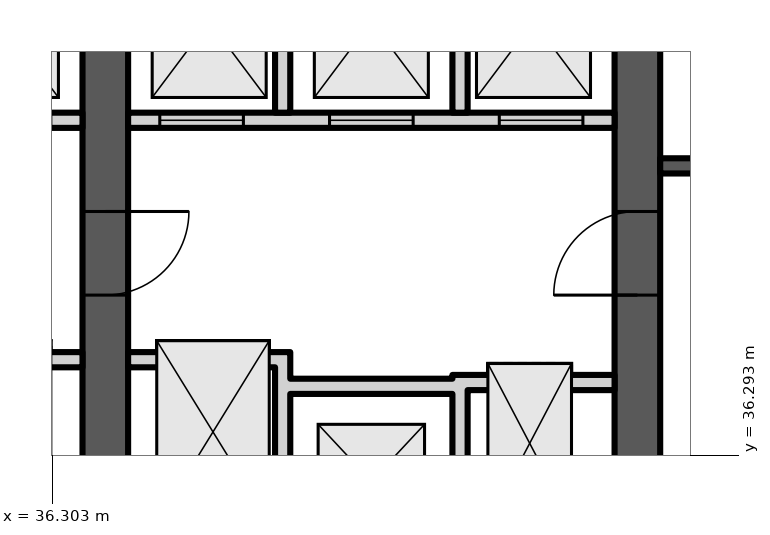
"""IFC4 building model, lengths in metres.
Left out: names, types, materials, properties, quantities, classifications, styles, units other than length and angle.
Written with IfcOpenShell. Run it as: python <this file> out.ifc"""

import sys

from ifc_helpers import new_model, si_unit, direction, frame, frame_2d, origin, place, context, subcontext, project, spatial, polyline, rectangle, outline, extrude, element, fill, save


model = new_model("IFC4")
c1 = context("Model", 3, precision=1e-05, world=origin(), true_north=direction((0.0, 1.0)))
c2 = subcontext(c1, "Body", "Model", "MODEL_VIEW")
j1 = project(units=[si_unit("LENGTHUNIT", "METRE"), si_unit("PLANEANGLEUNIT", "RADIAN")], contexts=[c1])
p1 = place(None, origin())
s1 = spatial("IfcSite", under=j1, at=p1, CompositionType="ELEMENT")
p2 = place(p1, origin())
s2 = spatial("IfcBuilding", under=s1, at=p2, CompositionType="ELEMENT")
p3 = place(p2, frame((0.0, 0.0, 257.5)))
s3 = spatial("IfcBuildingStorey", under=s2, at=p3, CompositionType="ELEMENT", Elevation=257.5)
p4 = place(p3, frame((37.0, 34.6, 0.0), z_axis=(0.0, 0.0, 1.0), x_axis=(0.0, 1.0, 0.0)))
e1 = element("IfcWall", 1, at=p4, inside=s3, PredefinedType="SHEAR", context=c2, shape_type="SweptSolid", body=[
    extrude(rectangle(XDim=14.784, YDim=0.6, at=frame_2d((7.392, 0.0))), origin(), (0.0, 0.0, 1.0), 3.6),
])
p5 = place(p4, frame((11.302, 0.0, 0.0)))
e2 = element("IfcOpeningElement", 2, at=p5, cuts=e1, PredefinedType="OPENING", context=c2, shape_type="SweptSolid", body=[
    extrude(rectangle(XDim=1.0, YDim=2.1, at=frame_2d((0.5, 1.05))), frame((0.0, 0.31, 0.0), z_axis=(0.0, -1.0, 0.0), x_axis=(1.0, 0.0, 0.0)), (0.0, 0.0, 1.0), 0.62),
])
p6 = place(p4, frame((3.8, 0.0, 0.0)))
e3 = element("IfcOpeningElement", 3, at=p6, cuts=e1, PredefinedType="OPENING", context=c2, shape_type="SweptSolid", body=[
    extrude(rectangle(XDim=1.1, YDim=2.1, at=frame_2d((0.55, 1.05))), frame((0.0, 0.31, 0.0), z_axis=(0.0, -1.0, 0.0), x_axis=(1.0, 0.0, 0.0)), (0.0, 0.0, 1.0), 0.62),
])
p7 = place(p3, frame((44.0, 34.6, 0.0), z_axis=(0.0, 0.0, 1.0), x_axis=(0.0, 1.0, 0.0)))
e4 = element("IfcWall", 4, at=p7, inside=s3, PredefinedType="SHEAR", context=c2, shape_type="SweptSolid", body=[
    extrude(rectangle(XDim=14.784, YDim=0.6, at=frame_2d((7.392, 0.0))), origin(), (0.0, 0.0, 1.0), 3.6),
])
p8 = place(p7, frame((11.608, 0.0, 0.0)))
e5 = element("IfcOpeningElement", 5, at=p8, cuts=e4, PredefinedType="OPENING", context=c2, shape_type="SweptSolid", body=[
    extrude(rectangle(XDim=1.0, YDim=2.1, at=frame_2d((0.5, 1.05))), frame((0.0, 0.31, 0.0), z_axis=(0.0, -1.0, 0.0), x_axis=(1.0, 0.0, 0.0)), (0.0, 0.0, 1.0), 0.62),
])
p9 = place(p7, frame((3.8, 0.0, 0.0)))
e6 = element("IfcOpeningElement", 6, at=p9, cuts=e4, PredefinedType="OPENING", context=c2, shape_type="SweptSolid", body=[
    extrude(rectangle(XDim=1.1, YDim=2.1, at=frame_2d((0.55, 1.05))), frame((0.0, 0.31, 0.0), z_axis=(0.0, -1.0, 0.0), x_axis=(1.0, 0.0, 0.0)), (0.0, 0.0, 1.0), 0.62),
])
p10 = place(p3, frame((30.3, 40.7, 0.0), z_axis=(0.0, 0.0, 1.0), x_axis=(1.0, 0.0, 0.0)))
e7 = element("IfcWall", 7, at=p10, inside=s3, PredefinedType="PARTITIONING", context=c2, shape_type="SweptSolid", body=[
    extrude(rectangle(XDim=6.4, YDim=0.2, at=frame_2d((3.2, 0.0))), origin(), (0.0, 0.0, 1.0), 3.2),
])
p11 = place(p10, frame((0.417, 0.0, 0.0)))
e8 = element("IfcOpeningElement", 8, at=p11, cuts=e7, PredefinedType="OPENING", context=c2, shape_type="SweptSolid", body=[
    extrude(rectangle(XDim=1.1, YDim=2.1, at=frame_2d((0.55, 1.05))), frame((0.0, 0.11, 0.0), z_axis=(0.0, -1.0, 0.0), x_axis=(1.0, 0.0, 0.0)), (0.0, 0.0, 1.0), 0.22),
])
p12 = place(p10, frame((2.65, 0.0, 0.0)))
e9 = element("IfcOpeningElement", 9, at=p12, cuts=e7, PredefinedType="OPENING", context=c2, shape_type="SweptSolid", body=[
    extrude(rectangle(XDim=1.1, YDim=2.1, at=frame_2d((0.55, 1.05))), frame((0.0, 0.11, 0.0), z_axis=(0.0, -1.0, 0.0), x_axis=(1.0, 0.0, 0.0)), (0.0, 0.0, 1.0), 0.22),
])
p13 = place(p10, frame((4.883, 0.0, 0.0)))
e10 = element("IfcOpeningElement", 10, at=p13, cuts=e7, PredefinedType="OPENING", context=c2, shape_type="SweptSolid", body=[
    extrude(rectangle(XDim=1.1, YDim=2.1, at=frame_2d((0.55, 1.05))), frame((0.0, 0.11, 0.0), z_axis=(0.0, -1.0, 0.0), x_axis=(1.0, 0.0, 0.0)), (0.0, 0.0, 1.0), 0.22),
])
p14 = place(p3, frame((0.0, 0.0, -0.0)))
e11 = element("IfcWall", 11, at=p14, inside=s3, PredefinedType="PARTITIONING", context=c2, shape_type="SweptSolid", body=[
    extrude(outline(polyline([(34.567, 37.65), (34.767, 37.65), (36.7, 37.65), (36.7, 37.45), (34.767, 37.45), (34.767, 34.6), (34.567, 34.6), (34.567, 37.65)])), origin(), (0.0, 0.0, 1.0), 3.2),
])
p15 = place(p3, frame((0.0, 0.0, -0.0)))
e12 = element("IfcWall", 12, at=p15, inside=s3, PredefinedType="PARTITIONING", context=c2, shape_type="SweptSolid", body=[
    extrude(outline(polyline([(32.433, 40.8), (32.233, 40.8), (32.233, 43.8), (30.3, 43.8), (30.3, 44.0), (36.7, 44.0), (36.7, 43.8), (34.767, 43.8), (34.767, 40.8), (34.567, 40.8), (34.567, 43.8), (32.433, 43.8), (32.433, 40.8)])), origin(), (0.0, 0.0, 1.0), 3.2),
])
p16 = place(p3, frame((37.3, 40.7, 0.0), z_axis=(0.0, 0.0, 1.0), x_axis=(1.0, 0.0, 0.0)))
e13 = element("IfcWall", 13, at=p16, inside=s3, PredefinedType="PARTITIONING", context=c2, shape_type="SweptSolid", body=[
    extrude(rectangle(XDim=6.4, YDim=0.2, at=frame_2d((3.2, 0.0))), origin(), (0.0, 0.0, 1.0), 3.2),
])
p17 = place(p16, frame((0.417, 0.0, 0.0)))
e14 = element("IfcOpeningElement", 14, at=p17, cuts=e13, PredefinedType="OPENING", context=c2, shape_type="SweptSolid", body=[
    extrude(rectangle(XDim=1.1, YDim=2.1, at=frame_2d((0.55, 1.05))), frame((0.0, 0.11, 0.0), z_axis=(0.0, -1.0, 0.0), x_axis=(1.0, 0.0, 0.0)), (0.0, 0.0, 1.0), 0.22),
])
p18 = place(p16, frame((2.65, 0.0, 0.0)))
e15 = element("IfcOpeningElement", 15, at=p18, cuts=e13, PredefinedType="OPENING", context=c2, shape_type="SweptSolid", body=[
    extrude(rectangle(XDim=1.1, YDim=2.1, at=frame_2d((0.55, 1.05))), frame((0.0, 0.11, 0.0), z_axis=(0.0, -1.0, 0.0), x_axis=(1.0, 0.0, 0.0)), (0.0, 0.0, 1.0), 0.22),
])
p19 = place(p16, frame((4.883, 0.0, 0.0)))
e16 = element("IfcOpeningElement", 16, at=p19, cuts=e13, PredefinedType="OPENING", context=c2, shape_type="SweptSolid", body=[
    extrude(rectangle(XDim=1.1, YDim=2.1, at=frame_2d((0.55, 1.05))), frame((0.0, 0.11, 0.0), z_axis=(0.0, -1.0, 0.0), x_axis=(1.0, 0.0, 0.0)), (0.0, 0.0, 1.0), 0.22),
])
p20 = place(p3, frame((0.0, 0.0, -0.0)))
e17 = element("IfcWall", 17, at=p20, inside=s3, PredefinedType="PARTITIONING", context=c2, shape_type="SweptSolid", body=[
    extrude(outline(polyline([(41.567, 37.1), (39.433, 37.1), (39.433, 34.6), (39.233, 34.6), (39.233, 37.45), (37.3, 37.45), (37.3, 37.65), (39.233, 37.65), (39.433, 37.65), (39.433, 37.3), (41.567, 37.3), (41.567, 37.35), (41.767, 37.35), (43.7, 37.35), (43.7, 37.15), (41.767, 37.15), (41.767, 34.6), (41.567, 34.6), (41.567, 37.1)])), origin(), (0.0, 0.0, 1.0), 3.2),
])
p21 = place(p3, frame((0.0, 0.0, -0.0)))
e18 = element("IfcWall", 18, at=p21, inside=s3, PredefinedType="PARTITIONING", context=c2, shape_type="SweptSolid", body=[
    extrude(outline(polyline([(39.433, 40.8), (39.233, 40.8), (39.233, 43.8), (37.3, 43.8), (37.3, 44.0), (43.7, 44.0), (43.7, 43.8), (41.767, 43.8), (41.767, 40.8), (41.567, 40.8), (41.567, 43.8), (39.433, 43.8), (39.433, 40.8)])), origin(), (0.0, 0.0, 1.0), 3.2),
])
p22 = place(p3, frame((44.3, 40.1, 0.0), z_axis=(0.0, 0.0, 1.0), x_axis=(1.0, 0.0, 0.0)))
e19 = element("IfcWall", 19, at=p22, inside=s3, PredefinedType="SHEAR", context=c2, shape_type="SweptSolid", body=[
    extrude(rectangle(XDim=6.4, YDim=0.2, at=frame_2d((3.2, 0.0))), origin(), (0.0, 0.0, 1.0), 3.2),
])
p23 = place(p22, frame((3.625, 0.0, 0.0)))
e20 = element("IfcOpeningElement", 20, at=p23, cuts=e19, PredefinedType="OPENING", context=c2, shape_type="SweptSolid", body=[
    extrude(rectangle(XDim=1.2, YDim=2.1, at=frame_2d((0.6, 1.05))), frame((0.0, 0.11, 0.0), z_axis=(0.0, -1.0, 0.0), x_axis=(1.0, 0.0, 0.0)), (0.0, 0.0, 1.0), 0.22),
])
p24 = place(p22, frame((0.625, 0.0, 0.0)))
e21 = element("IfcOpeningElement", 21, at=p24, cuts=e19, PredefinedType="OPENING", context=c2, shape_type="SweptSolid", body=[
    extrude(rectangle(XDim=0.9, YDim=2.1, at=frame_2d((0.45, 1.05))), frame((0.0, 0.11, 0.0), z_axis=(0.0, -1.0, 0.0), x_axis=(1.0, 0.0, 0.0)), (0.0, 0.0, 1.0), 0.22),
])
p25 = place(p17, origin())
e22 = element("IfcDoor", 22, at=p25, inside=s3, OperationType="DOUBLE_DOOR_SLIDING", PredefinedType="DOOR", context=c2, shape_type="SweptSolid", body=[
    extrude(rectangle(XDim=1.1, YDim=2.1, at=frame_2d((0.55, 1.05))), frame((0.0, 0.025, 0.0), z_axis=(0.0, -1.0, 0.0), x_axis=(1.0, 0.0, 0.0)), (0.0, 0.0, 1.0), 0.05),
])
fill(e14, e22)
p26 = place(p18, origin())
e23 = element("IfcDoor", 23, at=p26, inside=s3, OperationType="DOUBLE_DOOR_SLIDING", PredefinedType="DOOR", context=c2, shape_type="SweptSolid", body=[
    extrude(rectangle(XDim=1.1, YDim=2.1, at=frame_2d((0.55, 1.05))), frame((0.0, 0.025, 0.0), z_axis=(0.0, -1.0, 0.0), x_axis=(1.0, 0.0, 0.0)), (0.0, 0.0, 1.0), 0.05),
])
fill(e15, e23)
p27 = place(p19, origin())
e24 = element("IfcDoor", 24, at=p27, inside=s3, OperationType="DOUBLE_DOOR_SLIDING", PredefinedType="DOOR", context=c2, shape_type="SweptSolid", body=[
    extrude(rectangle(XDim=1.1, YDim=2.1, at=frame_2d((0.55, 1.05))), frame((0.0, 0.025, 0.0), z_axis=(0.0, -1.0, 0.0), x_axis=(1.0, 0.0, 0.0)), (0.0, 0.0, 1.0), 0.05),
])
fill(e16, e24)
p28 = place(p6, origin())
e25 = element("IfcDoor", 25, at=p28, inside=s3, OperationType="SINGLE_SWING_RIGHT", PredefinedType="DOOR", context=c2, shape_type="SweptSolid", body=[
    extrude(rectangle(XDim=1.1, YDim=2.1, at=frame_2d((0.55, 1.05))), frame((0.0, 0.025, 0.0), z_axis=(0.0, -1.0, 0.0), x_axis=(1.0, 0.0, 0.0)), (0.0, 0.0, 1.0), 0.05),
])
fill(e3, e25)
p29 = place(p9, origin())
e26 = element("IfcDoor", 26, at=p29, inside=s3, OperationType="SINGLE_SWING_LEFT", PredefinedType="DOOR", context=c2, shape_type="SweptSolid", body=[
    extrude(rectangle(XDim=1.1, YDim=2.1, at=frame_2d((0.55, 1.05))), frame((0.0, 0.025, 0.0), z_axis=(0.0, -1.0, 0.0), x_axis=(1.0, 0.0, 0.0)), (0.0, 0.0, 1.0), 0.05),
])
fill(e6, e26)
save(model, sys.argv[1])
